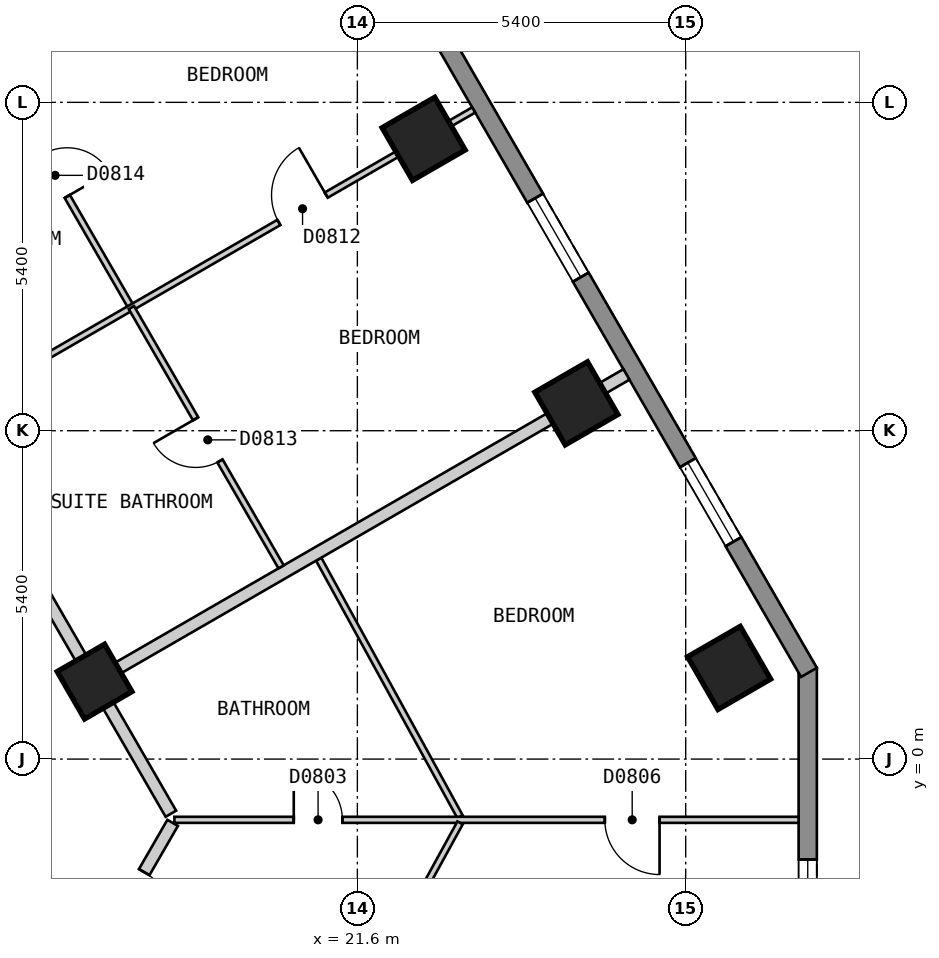
"""IFC4 building model, lengths in metres.
Left out: names, types, materials, properties, quantities, classifications, styles, units other than length and angle.
Written with IfcOpenShell. Run it as: python <this file> out.ifc"""

import sys

from ifc_helpers import new_model, si_unit, direction, frame, frame_2d, origin, origin_2d, place, context, subcontext, project, spatial, polyline, rectangle, outline, extrude, element, fill, save


model = new_model("IFC4")
c1 = context("Model", 3, precision=1e-05, world=origin(), true_north=direction((0.0, 1.0)))
c2 = subcontext(c1, "Body", "Model", "MODEL_VIEW")
j1 = project(units=[si_unit("LENGTHUNIT", "METRE"), si_unit("PLANEANGLEUNIT", "RADIAN")], contexts=[c1])
p1 = place(None, origin())
s1 = spatial("IfcSite", under=j1, at=p1, CompositionType="ELEMENT")
p2 = place(p1, origin())
s2 = spatial("IfcBuilding", under=s1, at=p2, CompositionType="ELEMENT")
p3 = place(p2, frame((0.0, 0.0, 84.0)))
s3 = spatial("IfcBuildingStorey", under=s2, at=p3, CompositionType="ELEMENT", Elevation=84.0)
for number, where, z_axis, x_axis in (
    (1, (27.714, 1.499, 0.0), (0.0, 0.0, 1.0), (-0.5, 0.866, 0.0)),
    (2, (25.202, 5.85, 0.0), (0.0, 0.0, 1.0), (-0.5, 0.866, 0.0)),
    (3, (22.69, 10.2, 0.0), (0.0, 0.0, 1.0), (-0.5, 0.866, 0.0)),
):
    element("IfcColumn", number, at=place(p3, frame(where, z_axis=z_axis, x_axis=x_axis)), inside=s3, PredefinedType="COLUMN", context=c2, shape_type="SweptSolid", body=[
        extrude(rectangle(XDim=1.0, YDim=1.0, at=origin_2d()), origin(), (0.0, 0.0, 1.0), 3.0),
    ])
p4 = place(p3, frame((17.278, 1.274, 0.0), z_axis=(0.0, 0.0, 1.0), x_axis=(-0.5, 0.866025403784, 0.0)))
e4 = element("IfcColumn", 4, at=p4, inside=s3, PredefinedType="COLUMN", context=c2, shape_type="SweptSolid", body=[
    extrude(rectangle(XDim=0.9, YDim=0.9, at=origin_2d()), origin(), (0.0, 0.0, 1.0), 3.0),
])
p5 = place(p3, frame((29.007, -3.5, 0.0), z_axis=(0.0, 0.0, 1.0), x_axis=(0.0, 1.0, 0.0)))
e5 = element("IfcWall", 5, at=p5, inside=s3, PredefinedType="SOLIDWALL", context=c2, shape_type="SweptSolid", body=[
    extrude(outline(polyline([(0.0, -0.15), (5.0, -0.15), (4.92, 0.15), (0.08, 0.15), (0.0, -0.15)])), origin(), (0.0, 0.0, 1.0), 2.7),
])
p6 = place(p5, frame((0.65, 0.0, 0.15)))
e6 = element("IfcOpeningElement", 6, at=p6, cuts=e5, PredefinedType="OPENING", context=c2, shape_type="SweptSolid", body=[
    extrude(rectangle(XDim=1.2, YDim=2.1, at=frame_2d((0.6, 1.05))), frame((0.0, 0.16, 0.0), z_axis=(0.0, -1.0, 0.0), x_axis=(1.0, 0.0, 0.0)), (0.0, 0.0, 1.0), 0.32),
])
p7 = place(p3, frame((29.027, 1.425, 0.0), z_axis=(0.0, 0.0, 1.0), x_axis=(-0.500027479704, 0.866009537788, 0.0)))
e7 = element("IfcWall", 7, at=p7, inside=s3, PredefinedType="SOLIDWALL", context=c2, shape_type="SweptSolid", body=[
    extrude(outline(polyline([(0.0, -0.15), (26.559, -0.15), (26.478, 0.15), (0.08, 0.15), (0.0, -0.15)])), origin(), (0.0, 0.0, 1.0), 2.7),
])
p8 = place(p7, frame((2.483, 0.0, 0.15)))
e8 = element("IfcOpeningElement", 8, at=p8, cuts=e7, PredefinedType="OPENING", context=c2, shape_type="SweptSolid", body=[
    extrude(rectangle(XDim=1.5, YDim=2.1, at=frame_2d((0.75, 1.05))), frame((0.0, 0.16, 0.0), z_axis=(0.0, -1.0, 0.0), x_axis=(1.0, 0.0, 0.0)), (0.0, 0.0, 1.0), 0.32),
])
p9 = place(p7, frame((7.506, 0.0, 0.15)))
e9 = element("IfcOpeningElement", 9, at=p9, cuts=e7, PredefinedType="OPENING", context=c2, shape_type="SweptSolid", body=[
    extrude(rectangle(XDim=1.5, YDim=2.1, at=frame_2d((0.75, 1.05))), frame((0.0, 0.16, 0.0), z_axis=(0.0, -1.0, 0.0), x_axis=(1.0, 0.0, 0.0)), (0.0, 0.0, 1.0), 0.32),
])
p10 = place(p7, frame((12.529, 0.0, 0.15)))
e10 = element("IfcOpeningElement", 10, at=p10, cuts=e7, PredefinedType="OPENING", context=c2, shape_type="SweptSolid", body=[
    extrude(rectangle(XDim=1.5, YDim=2.1, at=frame_2d((0.75, 1.05))), frame((0.0, 0.16, 0.0), z_axis=(0.0, -1.0, 0.0), x_axis=(1.0, 0.0, 0.0)), (0.0, 0.0, 1.0), 0.32),
])
p11 = place(p7, frame((17.552, 0.0, 0.15)))
e11 = element("IfcOpeningElement", 11, at=p11, cuts=e7, PredefinedType="OPENING", context=c2, shape_type="SweptSolid", body=[
    extrude(rectangle(XDim=1.5, YDim=2.1, at=frame_2d((0.75, 1.05))), frame((0.0, 0.16, 0.0), z_axis=(0.0, -1.0, 0.0), x_axis=(1.0, 0.0, 0.0)), (0.0, 0.0, 1.0), 0.32),
])
p12 = place(p7, frame((22.575, 0.0, 0.15)))
e12 = element("IfcOpeningElement", 12, at=p12, cuts=e7, PredefinedType="OPENING", context=c2, shape_type="SweptSolid", body=[
    extrude(rectangle(XDim=1.5, YDim=2.1, at=frame_2d((0.75, 1.05))), frame((0.0, 0.16, 0.0), z_axis=(0.0, -1.0, 0.0), x_axis=(1.0, 0.0, 0.0)), (0.0, 0.0, 1.0), 0.32),
])
p13 = place(p3, frame((8.488, 16.5, 0.0), z_axis=(0.0, 0.0, 1.0), x_axis=(0.499986836607, -0.86603300354, 0.0)))
e13 = element("IfcWall", 13, at=p13, inside=s3, PredefinedType="PARTITIONING", context=c2, shape_type="SweptSolid", body=[
    extrude(rectangle(XDim=20.09, YDim=0.2, at=frame_2d((10.045, 0.0))), origin(), (0.0, 0.0, 1.0), 2.7),
])
p14 = place(p13, frame((4.523, 0.0, 0.0)))
e14 = element("IfcOpeningElement", 14, at=p14, cuts=e13, PredefinedType="OPENING", context=c2, shape_type="SweptSolid", body=[
    extrude(rectangle(XDim=1.0, YDim=2.1, at=frame_2d((0.5, 1.05))), frame((0.0, 0.11, 0.0), z_axis=(0.0, -1.0, 0.0), x_axis=(1.0, 0.0, 0.0)), (0.0, 0.0, 1.0), 0.22),
])
p15 = place(p3, frame((15.771, -5.884, 0.0), z_axis=(0.0, 0.0, 1.0), x_axis=(0.499939494019, 0.866060334111, 0.0)))
e15 = element("IfcWall", 15, at=p15, inside=s3, PredefinedType="PARTITIONING", context=c2, shape_type="SweptSolid", body=[
    extrude(rectangle(XDim=5.583, YDim=0.2, at=frame_2d((2.792, 0.0))), origin(), (0.0, 0.0, 1.0), 2.7),
])
p16 = place(p15, frame((3.647, 0.0, 0.0)))
e16 = element("IfcOpeningElement", 16, at=p16, cuts=e15, PredefinedType="OPENING", context=c2, shape_type="SweptSolid", body=[
    extrude(rectangle(XDim=1.0, YDim=2.1, at=frame_2d((0.5, 1.05))), frame((0.0, 0.11, 0.0), z_axis=(0.0, -1.0, 0.0), x_axis=(1.0, 0.0, 0.0)), (0.0, 0.0, 1.0), 0.22),
])
p17 = place(p3, frame((15.398, 11.731, 0.0), z_axis=(0.0, 0.0, 1.0), x_axis=(0.500010064822, -0.866019592779, 0.0)))
e17 = element("IfcWall", 17, at=p17, inside=s3, PredefinedType="PARTITIONING", context=c2, shape_type="SweptSolid", body=[
    extrude(rectangle(XDim=4.972, YDim=0.1, at=frame_2d((2.486, 0.0))), origin(), (0.0, 0.0, 1.0), 2.7),
])
p18 = place(p17, frame((2.061, 0.0, 0.0)))
e18 = element("IfcOpeningElement", 18, at=p18, cuts=e17, PredefinedType="OPENING", context=c2, shape_type="SweptSolid", body=[
    extrude(rectangle(XDim=0.8, YDim=2.1, at=frame_2d((0.4, 1.05))), frame((0.0, 0.06, 0.0), z_axis=(0.0, -1.0, 0.0), x_axis=(1.0, 0.0, 0.0)), (0.0, 0.0, 1.0), 0.12),
])
p19 = place(p3, frame((20.964, 3.287, 0.0), z_axis=(0.0, 0.0, 1.0), x_axis=(0.48115599782, -0.87663499004, 0.0)))
e19 = element("IfcWall", 19, at=p19, inside=s3, PredefinedType="PARTITIONING", context=c2, shape_type="SweptSolid", body=[
    extrude(rectangle(XDim=4.83, YDim=0.1, at=frame_2d((2.415, 0.0))), origin(), (0.0, 0.0, 1.0), 2.7),
])
p20 = place(p3, frame((18.591, -0.999, 0.0), z_axis=(0.0, 0.0, 1.0), x_axis=(1.0, 0.0, 0.0)))
e20 = element("IfcWall", 20, at=p20, inside=s3, PredefinedType="PARTITIONING", context=c2, shape_type="SweptSolid", body=[
    extrude(rectangle(XDim=10.266, YDim=0.1, at=frame_2d((5.133, 0.0))), origin(), (0.0, 0.0, 1.0), 2.7),
])
p21 = place(p20, frame((1.963, 0.0, 0.0)))
e21 = element("IfcOpeningElement", 21, at=p21, cuts=e20, PredefinedType="OPENING", context=c2, shape_type="SweptSolid", body=[
    extrude(rectangle(XDim=0.8, YDim=2.1, at=frame_2d((0.4, 1.05))), frame((0.0, 0.06, 0.0), z_axis=(0.0, -1.0, 0.0), x_axis=(1.0, 0.0, 0.0)), (0.0, 0.0, 1.0), 0.12),
])
p22 = place(p20, frame((7.079, 0.0, 0.0)))
e22 = element("IfcOpeningElement", 22, at=p22, cuts=e20, PredefinedType="OPENING", context=c2, shape_type="SweptSolid", body=[
    extrude(rectangle(XDim=0.9, YDim=2.1, at=frame_2d((0.45, 1.05))), frame((0.0, 0.06, 0.0), z_axis=(0.0, -1.0, 0.0), x_axis=(1.0, 0.0, 0.0)), (0.0, 0.0, 1.0), 0.12),
])
p23 = place(p3, frame((20.966, -5.285, 0.0), z_axis=(0.0, 0.0, 1.0), x_axis=(0.480851410542, 0.876802099096, 0.0)))
e23 = element("IfcWall", 23, at=p23, inside=s3, PredefinedType="PARTITIONING", context=c2, shape_type="SweptSolid", body=[
    extrude(rectangle(XDim=4.831, YDim=0.1, at=frame_2d((2.416, 0.0))), origin(), (0.0, 0.0, 1.0), 2.7),
])
p24 = place(p23, frame((1.994, 0.0, 0.0)))
e24 = element("IfcOpeningElement", 24, at=p24, cuts=e23, PredefinedType="OPENING", context=c2, shape_type="SweptSolid", body=[
    extrude(rectangle(XDim=0.9, YDim=2.1, at=frame_2d((0.45, 1.05))), frame((0.0, 0.06, 0.0), z_axis=(0.0, -1.0, 0.0), x_axis=(1.0, 0.0, 0.0)), (0.0, 0.0, 1.0), 0.12),
])
p25 = place(p3, frame((14.853, 5.675, 0.0), z_axis=(0.0, 0.0, 1.0), x_axis=(0.866016855193, 0.500014806302, 0.0)))
e25 = element("IfcWall", 25, at=p25, inside=s3, PredefinedType="PARTITIONING", context=c2, shape_type="SweptSolid", body=[
    extrude(rectangle(XDim=10.0, YDim=0.1, at=frame_2d((5.0, 0.0))), origin(), (0.0, 0.0, 1.0), 2.7),
])
p26 = place(p25, frame((6.3, 0.0, 0.0)))
e26 = element("IfcOpeningElement", 26, at=p26, cuts=e25, PredefinedType="OPENING", context=c2, shape_type="SweptSolid", body=[
    extrude(rectangle(XDim=0.9, YDim=2.1, at=frame_2d((0.45, 1.05))), frame((0.0, 0.06, 0.0), z_axis=(0.0, -1.0, 0.0), x_axis=(1.0, 0.0, 0.0)), (0.0, 0.0, 1.0), 0.12),
])
p27 = place(p3, frame((12.342, 10.025, 0.0), z_axis=(0.0, 0.0, 1.0), x_axis=(0.865992435864, 0.500057097767, 0.0)))
e27 = element("IfcWall", 27, at=p27, inside=s3, PredefinedType="PARTITIONING", context=c2, shape_type="SweptSolid", body=[
    extrude(rectangle(XDim=9.999, YDim=0.1, at=frame_2d((5.0, 0.0))), origin(), (0.0, 0.0, 1.0), 2.7),
])
p28 = place(p27, frame((4.795, 0.0, 0.0)))
e28 = element("IfcOpeningElement", 28, at=p28, cuts=e27, PredefinedType="OPENING", context=c2, shape_type="SweptSolid", body=[
    extrude(rectangle(XDim=0.9, YDim=2.1, at=frame_2d((0.45, 1.05))), frame((0.0, 0.06, 0.0), z_axis=(0.0, -1.0, 0.0), x_axis=(1.0, 0.0, 0.0)), (0.0, 0.0, 1.0), 0.12),
])
p29 = place(p3, frame((17.365, 1.325, 0.0), z_axis=(0.0, 0.0, 1.0), x_axis=(0.866016855193, 0.500014806302, 0.0)))
e29 = element("IfcWall", 29, at=p29, inside=s3, PredefinedType="PARTITIONING", context=c2, shape_type="SweptSolid", body=[
    extrude(rectangle(XDim=10.0, YDim=0.2, at=frame_2d((5.0, 0.0))), origin(), (0.0, 0.0, 1.0), 2.7),
])
p30 = place(p3, frame((17.884, 7.425, 0.0), z_axis=(0.0, 0.0, 1.0), x_axis=(0.500000007376, -0.866025399526, 0.0)))
e30 = element("IfcWall", 30, at=p30, inside=s3, PredefinedType="PARTITIONING", context=c2, shape_type="SweptSolid", body=[
    extrude(rectangle(XDim=4.924, YDim=0.1, at=frame_2d((2.462, 0.0))), origin(), (0.0, 0.0, 1.0), 2.7),
])
p31 = place(p30, frame((2.112, 0.0, 0.0)))
e31 = element("IfcOpeningElement", 31, at=p31, cuts=e30, PredefinedType="OPENING", context=c2, shape_type="SweptSolid", body=[
    extrude(rectangle(XDim=0.8, YDim=2.1, at=frame_2d((0.4, 1.05))), frame((0.0, 0.06, 0.0), z_axis=(0.0, -1.0, 0.0), x_axis=(1.0, 0.0, 0.0)), (0.0, 0.0, 1.0), 0.12),
])
p32 = place(p6, origin())
e32 = element("IfcWindow", 32, at=p32, inside=s3, PartitioningType="SINGLE_PANEL", PredefinedType="WINDOW", context=c2, shape_type="SweptSolid", body=[
    extrude(rectangle(XDim=1.2, YDim=2.1, at=frame_2d((0.6, 1.05))), frame((0.0, 0.03, 0.0), z_axis=(0.0, -1.0, 0.0), x_axis=(1.0, 0.0, 0.0)), (0.0, 0.0, 1.0), 0.06),
])
fill(e6, e32)
p33 = place(p8, origin())
e33 = element("IfcWindow", 33, at=p33, inside=s3, PartitioningType="SINGLE_PANEL", PredefinedType="WINDOW", context=c2, shape_type="SweptSolid", body=[
    extrude(rectangle(XDim=1.5, YDim=2.1, at=frame_2d((0.75, 1.05))), frame((0.0, 0.03, 0.0), z_axis=(0.0, -1.0, 0.0), x_axis=(1.0, 0.0, 0.0)), (0.0, 0.0, 1.0), 0.06),
])
fill(e8, e33)
p34 = place(p9, origin())
e34 = element("IfcWindow", 34, at=p34, inside=s3, PartitioningType="SINGLE_PANEL", PredefinedType="WINDOW", context=c2, shape_type="SweptSolid", body=[
    extrude(rectangle(XDim=1.5, YDim=2.1, at=frame_2d((0.75, 1.05))), frame((0.0, 0.03, 0.0), z_axis=(0.0, -1.0, 0.0), x_axis=(1.0, 0.0, 0.0)), (0.0, 0.0, 1.0), 0.06),
])
fill(e9, e34)
p35 = place(p16, origin())
e35 = element("IfcDoor", 35, at=p35, inside=s3, OperationType="SINGLE_SWING_LEFT", PredefinedType="DOOR", context=c2, shape_type="SweptSolid", body=[
    extrude(rectangle(XDim=1.0, YDim=2.1, at=frame_2d((0.5, 1.05))), frame((0.0, 0.025, 0.0), z_axis=(0.0, -1.0, 0.0), x_axis=(1.0, 0.0, 0.0)), (0.0, 0.0, 1.0), 0.05),
])
fill(e16, e35)
p36 = place(p21, origin())
e36 = element("IfcDoor", 36, at=p36, inside=s3, OperationType="SINGLE_SWING_LEFT", PredefinedType="DOOR", context=c2, shape_type="SweptSolid", body=[
    extrude(rectangle(XDim=0.8, YDim=2.1, at=frame_2d((0.4, 1.05))), frame((0.0, 0.025, 0.0), z_axis=(0.0, -1.0, 0.0), x_axis=(1.0, 0.0, 0.0)), (0.0, 0.0, 1.0), 0.05),
])
fill(e21, e36)
p37 = place(p22, origin())
e37 = element("IfcDoor", 37, at=p37, inside=s3, OperationType="SINGLE_SWING_RIGHT", PredefinedType="DOOR", context=c2, shape_type="SweptSolid", body=[
    extrude(rectangle(XDim=0.9, YDim=2.1, at=frame_2d((0.45, 1.05))), frame((0.0, 0.025, 0.0), z_axis=(0.0, -1.0, 0.0), x_axis=(1.0, 0.0, 0.0)), (0.0, 0.0, 1.0), 0.05),
])
fill(e22, e37)
p38 = place(p26, origin())
e38 = element("IfcDoor", 38, at=p38, inside=s3, OperationType="SINGLE_SWING_RIGHT", PredefinedType="DOOR", context=c2, shape_type="SweptSolid", body=[
    extrude(rectangle(XDim=0.9, YDim=2.1, at=frame_2d((0.45, 1.05))), frame((0.0, 0.025, 0.0), z_axis=(0.0, -1.0, 0.0), x_axis=(1.0, 0.0, 0.0)), (0.0, 0.0, 1.0), 0.05),
])
fill(e26, e38)
p39 = place(p31, origin())
e39 = element("IfcDoor", 39, at=p39, inside=s3, OperationType="SINGLE_SWING_LEFT", PredefinedType="DOOR", context=c2, shape_type="SweptSolid", body=[
    extrude(rectangle(XDim=0.8, YDim=2.1, at=frame_2d((0.4, 1.05))), frame((0.0, 0.025, 0.0), z_axis=(0.0, -1.0, 0.0), x_axis=(1.0, 0.0, 0.0)), (0.0, 0.0, 1.0), 0.05),
])
fill(e31, e39)
p40 = place(p18, origin())
e40 = element("IfcDoor", 40, at=p40, inside=s3, OperationType="SINGLE_SWING_RIGHT", PredefinedType="DOOR", context=c2, shape_type="SweptSolid", body=[
    extrude(rectangle(XDim=0.8, YDim=2.1, at=frame_2d((0.4, 1.05))), frame((0.0, 0.025, 0.0), z_axis=(0.0, -1.0, 0.0), x_axis=(1.0, 0.0, 0.0)), (0.0, 0.0, 1.0), 0.05),
])
fill(e18, e40)
save(model, sys.argv[1])
